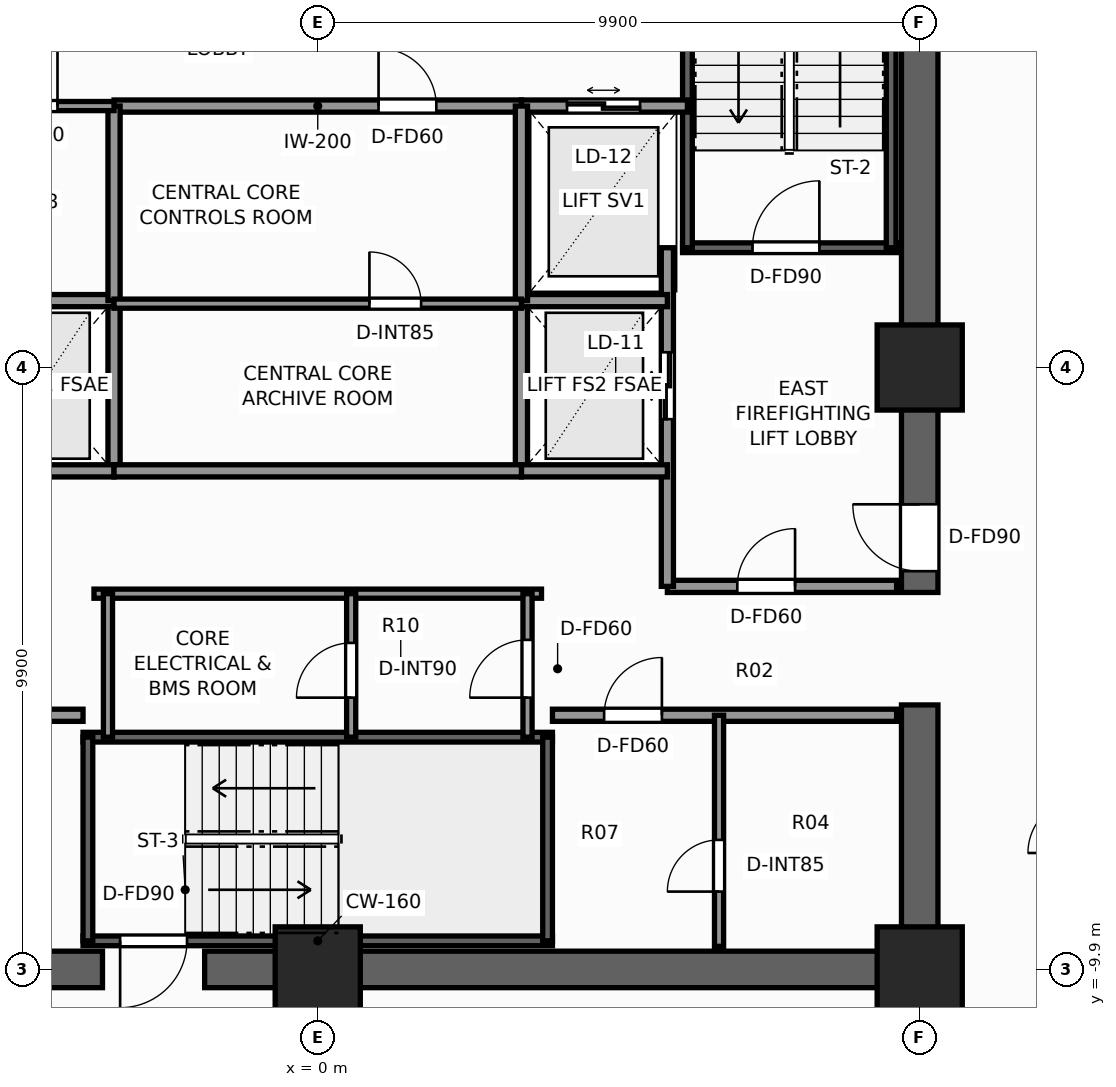
"""IFC4 building model, lengths in metres.
Left out: names, types, materials, properties, quantities, classifications, styles, units other than length and angle.
Written with IfcOpenShell. Run it as: python <this file> out.ifc"""

import sys

from ifc_helpers import new_model, si_unit, direction, frame, frame_2d, origin, origin_2d, place, context, subcontext, project, spatial, rectangle, extrude, element, fill, save


model = new_model("IFC4")
c1 = context("Model", 3, precision=1e-05, world=origin(), true_north=direction((0.0, 1.0)))
c2 = subcontext(c1, "Body", "Model", "MODEL_VIEW")
j1 = project(units=[si_unit("LENGTHUNIT", "METRE"), si_unit("PLANEANGLEUNIT", "RADIAN")], contexts=[c1])
p1 = place(None, origin())
s1 = spatial("IfcSite", under=j1, at=p1, CompositionType="ELEMENT")
p2 = place(p1, origin())
s2 = spatial("IfcBuilding", under=s1, at=p2, CompositionType="ELEMENT")
p3 = place(p2, frame((0.0, 0.0, 60.1)))
s3 = spatial("IfcBuildingStorey", under=s2, at=p3, CompositionType="ELEMENT", Elevation=60.1)
p4 = place(p3, frame((10.2, -9.9, 0.0), z_axis=(0.0, 0.0, 1.0), x_axis=(-1.0, 0.0, 0.0)))
e1 = element("IfcWall", 1, at=p4, inside=s3, PredefinedType="SHEAR", context=c2, shape_type="SweptSolid", body=[
    extrude(rectangle(XDim=12.06, YDim=0.6, at=frame_2d((6.03, 0.0))), origin(), (0.0, 0.0, 1.0), 3.3),
])
p5 = place(p3, frame((-3.54, -9.9, 0.0), z_axis=(0.0, 0.0, 1.0), x_axis=(-1.0, 0.0, 0.0)))
e2 = element("IfcWall", 2, at=p5, inside=s3, PredefinedType="SHEAR", context=c2, shape_type="SweptSolid", body=[
    extrude(rectangle(XDim=6.66, YDim=0.6, at=frame_2d((3.33, 0.0))), origin(), (0.0, 0.0, 1.0), 3.3),
])
p6 = place(p3, frame((9.9, -9.6, 0.0), z_axis=(0.0, 0.0, 1.0), x_axis=(0.0, 1.0, 0.0)))
e3 = element("IfcWall", 3, at=p6, inside=s3, PredefinedType="SHEAR", context=c2, shape_type="SweptSolid", body=[
    extrude(rectangle(XDim=4.05, YDim=0.6, at=frame_2d((2.025, 0.0))), origin(), (0.0, 0.0, 1.0), 3.3),
])
p7 = place(p3, frame((9.9, -3.7, 0.0), z_axis=(0.0, 0.0, 1.0), x_axis=(0.0, 1.0, 0.0)))
e4 = element("IfcWall", 4, at=p7, inside=s3, PredefinedType="SHEAR", context=c2, shape_type="SweptSolid", body=[
    extrude(rectangle(XDim=13.3, YDim=0.6, at=frame_2d((6.65, 0.0))), origin(), (0.0, 0.0, 1.0), 3.3),
])
p8 = place(p7, frame((0.35, 0.0, 0.0)))
e5 = element("IfcOpeningElement", 5, at=p8, cuts=e4, PredefinedType="OPENING", context=c2, shape_type="SweptSolid", body=[
    extrude(rectangle(XDim=1.1, YDim=2.2, at=frame_2d((0.55, 1.1))), frame((0.0, 0.31, 0.0), z_axis=(0.0, -1.0, 0.0), x_axis=(1.0, 0.0, 0.0)), (0.0, 0.0, 1.0), 0.62),
])
for number, where, z_axis, x_axis in (
    (6, (9.9, -9.9, 0.0), (0.0, 0.0, 1.0), (1.0, 0.0, 0.0)),
    (7, (0.0, -9.9, 0.0), (0.0, 0.0, 1.0), (1.0, 0.0, 0.0)),
    (8, (9.9, 0.0, 0.0), (0.0, 0.0, 1.0), (1.0, 0.0, 0.0)),
):
    element("IfcColumn", number, at=place(p3, frame(where, z_axis=z_axis, x_axis=x_axis)), inside=s3, PredefinedType="COLUMN", context=c2, shape_type="SweptSolid", body=[
        extrude(rectangle(XDim=1.4, YDim=1.4, at=origin_2d()), origin(), (0.0, 0.0, 1.0), 3.3),
    ])
p9 = place(p3, frame((6.0, 1.97, 0.0), z_axis=(0.0, 0.0, 1.0), x_axis=(1.0, 0.0, 0.0)))
e9 = element("IfcWall", 9, at=p9, inside=s3, PredefinedType="SHEAR", context=c2, shape_type="SweptSolid", body=[
    extrude(rectangle(XDim=3.52, YDim=0.16, at=frame_2d((1.76, 0.0))), origin(), (0.0, 0.0, 1.0), 3.3),
])
p10 = place(p9, frame((1.15, 0.0, 0.0)))
e10 = element("IfcOpeningElement", 10, at=p10, cuts=e9, PredefinedType="OPENING", context=c2, shape_type="SweptSolid", body=[
    extrude(rectangle(XDim=1.1, YDim=2.2, at=frame_2d((0.55, 1.1))), frame((0.0, 0.09, 0.0), z_axis=(0.0, -1.0, 0.0), x_axis=(1.0, 0.0, 0.0)), (0.0, 0.0, 1.0), 0.18),
])
for number, where, z_axis, x_axis in (
    (11, (6.08, 1.97, 0.0), (0.0, 0.0, 1.0), (0.0, 1.0, 0.0)),
    (12, (9.43, 1.97, 0.0), (0.0, 0.0, 1.0), (0.0, 1.0, 0.0)),
):
    element("IfcWall", number, at=place(p3, frame(where, z_axis=z_axis, x_axis=x_axis)), inside=s3, PredefinedType="SHEAR", context=c2, shape_type="SweptSolid", body=[
        extrude(rectangle(XDim=7.56, YDim=0.16, at=frame_2d((3.78, 0.0))), origin(), (0.0, 0.0, 1.0), 3.3),
    ])
p11 = place(p3, frame((3.86, -9.43, 0.0), z_axis=(0.0, 0.0, 1.0), x_axis=(-1.0, 0.0, 0.0)))
e13 = element("IfcWall", 13, at=p11, inside=s3, PredefinedType="SHEAR", context=c2, shape_type="SweptSolid", body=[
    extrude(rectangle(XDim=7.72, YDim=0.16, at=frame_2d((3.86, 0.0))), origin(), (0.0, 0.0, 1.0), 3.3),
])
p12 = place(p11, frame((6.01, 0.0, 0.0)))
e14 = element("IfcOpeningElement", 14, at=p12, cuts=e13, PredefinedType="OPENING", context=c2, shape_type="SweptSolid", body=[
    extrude(rectangle(XDim=1.1, YDim=2.2, at=frame_2d((0.55, 1.1))), frame((0.0, 0.09, 0.0), z_axis=(0.0, -1.0, 0.0), x_axis=(1.0, 0.0, 0.0)), (0.0, 0.0, 1.0), 0.18),
])
p13 = place(p3, frame((-3.86, -6.08, 0.0), z_axis=(0.0, 0.0, 1.0), x_axis=(1.0, 0.0, 0.0)))
e15 = element("IfcWall", 15, at=p13, inside=s3, PredefinedType="SHEAR", context=c2, shape_type="SweptSolid", body=[
    extrude(rectangle(XDim=7.72, YDim=0.16, at=frame_2d((3.86, 0.0))), origin(), (0.0, 0.0, 1.0), 3.3),
])
for number, where, z_axis, x_axis in (
    (16, (-3.78, -9.43, 0.0), (0.0, 0.0, 1.0), (0.0, 1.0, 0.0)),
    (17, (3.78, -9.43, 0.0), (0.0, 0.0, 1.0), (0.0, 1.0, 0.0)),
):
    element("IfcWall", number, at=place(p3, frame(where, z_axis=z_axis, x_axis=x_axis)), inside=s3, PredefinedType="SHEAR", context=c2, shape_type="SweptSolid", body=[
        extrude(rectangle(XDim=3.35, YDim=0.16, at=frame_2d((1.675, 0.0))), origin(), (0.0, 0.0, 1.0), 3.3),
    ])
p14 = place(p3, frame((-3.35, -1.7, 0.0), z_axis=(0.0, 0.0, 1.0), x_axis=(0.0, 1.0, 0.0)))
e18 = element("IfcWall", 18, at=p14, inside=s3, PredefinedType="SOLIDWALL", context=c2, shape_type="SweptSolid", body=[
    extrude(rectangle(XDim=2.8, YDim=0.2, at=frame_2d((1.4, 0.0))), origin(), (0.0, 0.0, 1.0), 2.95),
])
for number, where, z_axis, x_axis in (
    (19, (-5.75, -1.7, 0.0), (0.0, 0.0, 1.0), (1.0, 0.0, 0.0)),
    (20, (-5.75, 1.1, 0.0), (0.0, 0.0, 1.0), (1.0, 0.0, 0.0)),
):
    element("IfcWall", number, at=place(p3, frame(where, z_axis=z_axis, x_axis=x_axis)), inside=s3, PredefinedType="SOLIDWALL", context=c2, shape_type="SweptSolid", body=[
        extrude(rectangle(XDim=2.4, YDim=0.2, at=frame_2d((1.2, 0.0))), origin(), (0.0, 0.0, 1.0), 2.95),
    ])
p15 = place(p3, frame((5.75, -3.6, 0.0), z_axis=(0.0, 0.0, 1.0), x_axis=(1.0, 0.0, 0.0)))
e21 = element("IfcWall", 21, at=p15, inside=s3, PredefinedType="SOLIDWALL", context=c2, shape_type="SweptSolid", body=[
    extrude(rectangle(XDim=3.77, YDim=0.2, at=frame_2d((1.885, 0.0))), origin(), (0.0, 0.0, 1.0), 2.95),
])
p16 = place(p15, frame((1.15, 0.0, 0.0)))
e22 = element("IfcOpeningElement", 22, at=p16, cuts=e21, PredefinedType="OPENING", context=c2, shape_type="SweptSolid", body=[
    extrude(rectangle(XDim=0.95, YDim=2.06, at=frame_2d((0.475, 1.03))), frame((0.0, 0.11, 0.0), z_axis=(0.0, -1.0, 0.0), x_axis=(1.0, 0.0, 0.0)), (0.0, 0.0, 1.0), 0.22),
])
p17 = place(p3, frame((5.75, -3.6, 0.0), z_axis=(0.0, 0.0, 1.0), x_axis=(0.0, 1.0, 0.0)))
e23 = element("IfcWall", 23, at=p17, inside=s3, PredefinedType="SOLIDWALL", context=c2, shape_type="SweptSolid", body=[
    extrude(rectangle(XDim=5.57, YDim=0.2, at=frame_2d((2.785, 0.0))), origin(), (0.0, 0.0, 1.0), 2.95),
])
p18 = place(p17, frame((2.75, 0.0, 0.0)))
e24 = element("IfcOpeningElement", 24, at=p18, cuts=e23, PredefinedType="OPENING", context=c2, shape_type="SweptSolid", body=[
    extrude(rectangle(XDim=1.1, YDim=2.2, at=frame_2d((0.55, 1.1))), frame((0.0, 0.11, 0.0), z_axis=(0.0, -1.0, 0.0), x_axis=(1.0, 0.0, 0.0)), (0.0, 0.0, 1.0), 0.22),
])
p19 = place(p3, frame((3.35, -1.7, 0.0), z_axis=(0.0, 0.0, 1.0), x_axis=(0.0, 1.0, 0.0)))
e25 = element("IfcWall", 25, at=p19, inside=s3, PredefinedType="SOLIDWALL", context=c2, shape_type="SweptSolid", body=[
    extrude(rectangle(XDim=2.8, YDim=0.2, at=frame_2d((1.4, 0.0))), origin(), (0.0, 0.0, 1.0), 2.95),
])
for number, where, z_axis, x_axis in (
    (26, (3.35, -1.7, 0.0), (0.0, 0.0, 1.0), (1.0, 0.0, 0.0)),
    (27, (3.35, 1.1, 0.0), (0.0, 0.0, 1.0), (1.0, 0.0, 0.0)),
):
    element("IfcWall", number, at=place(p3, frame(where, z_axis=z_axis, x_axis=x_axis)), inside=s3, PredefinedType="SOLIDWALL", context=c2, shape_type="SweptSolid", body=[
        extrude(rectangle(XDim=2.4, YDim=0.2, at=frame_2d((1.2, 0.0))), origin(), (0.0, 0.0, 1.0), 2.95),
    ])
p20 = place(p3, frame((3.35, 4.3, 0.0), z_axis=(0.0, 0.0, 1.0), x_axis=(1.0, 0.0, 0.0)))
e28 = element("IfcWall", 28, at=p20, inside=s3, PredefinedType="SOLIDWALL", context=c2, shape_type="SweptSolid", body=[
    extrude(rectangle(XDim=2.73, YDim=0.2, at=frame_2d((1.365, 0.0))), origin(), (0.0, 0.0, 1.0), 2.95),
])
p21 = place(p20, frame((0.75, 0.0, 0.0)))
e29 = element("IfcOpeningElement", 29, at=p21, cuts=e28, PredefinedType="OPENING", context=c2, shape_type="SweptSolid", body=[
    extrude(rectangle(XDim=1.2, YDim=2.25, at=frame_2d((0.6, 1.125))), frame((0.0, 0.11, 0.0), z_axis=(0.0, -1.0, 0.0), x_axis=(1.0, 0.0, 0.0)), (0.0, 0.0, 1.0), 0.22),
])
p22 = place(p3, frame((-9.52, -5.72, 0.0), z_axis=(0.0, 0.0, 1.0), x_axis=(1.0, 0.0, 0.0)))
e30 = element("IfcWall", 30, at=p22, inside=s3, PredefinedType="SOLIDWALL", context=c2, shape_type="SweptSolid", body=[
    extrude(rectangle(XDim=5.66, YDim=0.2, at=frame_2d((2.83, 0.0))), origin(), (0.0, 0.0, 1.0), 2.95),
])
p23 = place(p22, frame((3.6, 0.0, 0.0)))
e31 = element("IfcOpeningElement", 31, at=p23, cuts=e30, PredefinedType="OPENING", context=c2, shape_type="SweptSolid", body=[
    extrude(rectangle(XDim=0.95, YDim=2.06, at=frame_2d((0.475, 1.03))), frame((0.0, 0.11, 0.0), z_axis=(0.0, -1.0, 0.0), x_axis=(1.0, 0.0, 0.0)), (0.0, 0.0, 1.0), 0.22),
])
p24 = place(p3, frame((3.86, -5.72, 0.0), z_axis=(0.0, 0.0, 1.0), x_axis=(1.0, 0.0, 0.0)))
e32 = element("IfcWall", 32, at=p24, inside=s3, PredefinedType="SOLIDWALL", context=c2, shape_type="SweptSolid", body=[
    extrude(rectangle(XDim=5.66, YDim=0.2, at=frame_2d((2.83, 0.0))), origin(), (0.0, 0.0, 1.0), 2.95),
])
p25 = place(p24, frame((0.85, 0.0, 0.0)))
e33 = element("IfcOpeningElement", 33, at=p25, cuts=e32, PredefinedType="OPENING", context=c2, shape_type="SweptSolid", body=[
    extrude(rectangle(XDim=0.95, YDim=2.06, at=frame_2d((0.475, 1.03))), frame((0.0, 0.11, 0.0), z_axis=(0.0, -1.0, 0.0), x_axis=(1.0, 0.0, 0.0)), (0.0, 0.0, 1.0), 0.22),
])
p26 = place(p3, frame((6.6, -9.52, 0.0), z_axis=(0.0, 0.0, 1.0), x_axis=(0.0, 1.0, 0.0)))
e34 = element("IfcWall", 34, at=p26, inside=s3, PredefinedType="PARTITIONING", context=c2, shape_type="SweptSolid", body=[
    extrude(rectangle(XDim=3.8, YDim=0.15, at=frame_2d((1.9, 0.0))), origin(), (0.0, 0.0, 1.0), 2.95),
])
p27 = place(p26, frame((0.9, 0.0, 0.0)))
e35 = element("IfcOpeningElement", 35, at=p27, cuts=e34, PredefinedType="OPENING", context=c2, shape_type="SweptSolid", body=[
    extrude(rectangle(XDim=0.85, YDim=2.03, at=frame_2d((0.425, 1.015))), frame((0.0, 0.085, 0.0), z_axis=(0.0, -1.0, 0.0), x_axis=(1.0, 0.0, 0.0)), (0.0, 0.0, 1.0), 0.17),
])
p28 = place(p3, frame((-3.35, 4.3, 0.0), z_axis=(0.0, 0.0, 1.0), x_axis=(1.0, 0.0, 0.0)))
e36 = element("IfcWall", 36, at=p28, inside=s3, PredefinedType="SOLIDWALL", context=c2, shape_type="SweptSolid", body=[
    extrude(rectangle(XDim=6.7, YDim=0.2, at=frame_2d((3.35, 0.0))), origin(), (0.0, 0.0, 1.0), 2.95),
])
p29 = place(p28, frame((4.35, 0.0, 0.0)))
e37 = element("IfcOpeningElement", 37, at=p29, cuts=e36, PredefinedType="OPENING", context=c2, shape_type="SweptSolid", body=[
    extrude(rectangle(XDim=0.95, YDim=2.06, at=frame_2d((0.475, 1.03))), frame((0.0, 0.11, 0.0), z_axis=(0.0, -1.0, 0.0), x_axis=(1.0, 0.0, 0.0)), (0.0, 0.0, 1.0), 0.22),
])
p30 = place(p3, frame((-3.35, -1.7, 0.0), z_axis=(0.0, 0.0, 1.0), x_axis=(1.0, 0.0, 0.0)))
e38 = element("IfcWall", 38, at=p30, inside=s3, PredefinedType="SOLIDWALL", context=c2, shape_type="SweptSolid", body=[
    extrude(rectangle(XDim=6.7, YDim=0.2, at=frame_2d((3.35, 0.0))), origin(), (0.0, 0.0, 1.0), 2.95),
])
for number, where, z_axis, x_axis in (
    (39, (-3.35, 1.1, 0.0), (0.0, 0.0, 1.0), (0.0, 1.0, 0.0)),
    (40, (3.35, 1.1, 0.0), (0.0, 0.0, 1.0), (0.0, 1.0, 0.0)),
):
    element("IfcWall", number, at=place(p3, frame(where, z_axis=z_axis, x_axis=x_axis)), inside=s3, PredefinedType="SOLIDWALL", context=c2, shape_type="SweptSolid", body=[
        extrude(rectangle(XDim=3.2, YDim=0.2, at=frame_2d((1.6, 0.0))), origin(), (0.0, 0.0, 1.0), 2.95),
    ])
p31 = place(p3, frame((-3.35, 1.05, 0.0), z_axis=(0.0, 0.0, 1.0), x_axis=(1.0, 0.0, 0.0)))
e41 = element("IfcWall", 41, at=p31, inside=s3, PredefinedType="PARTITIONING", context=c2, shape_type="SweptSolid", body=[
    extrude(rectangle(XDim=6.7, YDim=0.15, at=frame_2d((3.35, 0.0))), origin(), (0.0, 0.0, 1.0), 2.95),
])
p32 = place(p31, frame((4.2, 0.0, 0.0)))
e42 = element("IfcOpeningElement", 42, at=p32, cuts=e41, PredefinedType="OPENING", context=c2, shape_type="SweptSolid", body=[
    extrude(rectangle(XDim=0.85, YDim=2.03, at=frame_2d((0.425, 1.015))), frame((0.0, 0.085, 0.0), z_axis=(0.0, -1.0, 0.0), x_axis=(1.0, 0.0, 0.0)), (0.0, 0.0, 1.0), 0.17),
])
p33 = place(p3, frame((-3.68, -3.72, 0.0), z_axis=(0.0, 0.0, 1.0), x_axis=(1.0, 0.0, 0.0)))
e43 = element("IfcWall", 43, at=p33, inside=s3, PredefinedType="PARTITIONING", context=c2, shape_type="SweptSolid", body=[
    extrude(rectangle(XDim=7.36, YDim=0.15, at=frame_2d((3.68, 0.0))), origin(), (0.0, 0.0, 1.0), 2.95),
])
p34 = place(p3, frame((3.45, -6.08, 0.0), z_axis=(0.0, 0.0, 1.0), x_axis=(0.0, 1.0, 0.0)))
e44 = element("IfcWall", 44, at=p34, inside=s3, PredefinedType="PARTITIONING", context=c2, shape_type="SweptSolid", body=[
    extrude(rectangle(XDim=2.36, YDim=0.15, at=frame_2d((1.18, 0.0))), origin(), (0.0, 0.0, 1.0), 2.95),
])
p35 = place(p34, frame((0.65, 0.0, 0.0)))
e45 = element("IfcOpeningElement", 45, at=p35, cuts=e44, PredefinedType="OPENING", context=c2, shape_type="SweptSolid", body=[
    extrude(rectangle(XDim=0.95, YDim=2.06, at=frame_2d((0.475, 1.03))), frame((0.0, 0.085, 0.0), z_axis=(0.0, -1.0, 0.0), x_axis=(1.0, 0.0, 0.0)), (0.0, 0.0, 1.0), 0.17),
])
p36 = place(p3, frame((-3.45, -6.08, 0.0), z_axis=(0.0, 0.0, 1.0), x_axis=(0.0, 1.0, 0.0)))
e46 = element("IfcWall", 46, at=p36, inside=s3, PredefinedType="PARTITIONING", context=c2, shape_type="SweptSolid", body=[
    extrude(rectangle(XDim=2.36, YDim=0.15, at=frame_2d((1.18, 0.0))), origin(), (0.0, 0.0, 1.0), 2.95),
])
p37 = place(p3, frame((0.55, -6.08, 0.0), z_axis=(0.0, 0.0, 1.0), x_axis=(0.0, 1.0, 0.0)))
e47 = element("IfcWall", 47, at=p37, inside=s3, PredefinedType="PARTITIONING", context=c2, shape_type="SweptSolid", body=[
    extrude(rectangle(XDim=2.36, YDim=0.15, at=frame_2d((1.18, 0.0))), origin(), (0.0, 0.0, 1.0), 2.95),
])
p38 = place(p37, frame((0.65, 0.0, 0.0)))
e48 = element("IfcOpeningElement", 48, at=p38, cuts=e47, PredefinedType="OPENING", context=c2, shape_type="SweptSolid", body=[
    extrude(rectangle(XDim=0.9, YDim=2.06, at=frame_2d((0.45, 1.03))), frame((0.0, 0.085, 0.0), z_axis=(0.0, -1.0, 0.0), x_axis=(1.0, 0.0, 0.0)), (0.0, 0.0, 1.0), 0.17),
])
p39 = place(p3, frame((-6.08, 4.3, 0.0), z_axis=(0.0, 0.0, 1.0), x_axis=(1.0, 0.0, 0.0)))
e49 = element("IfcWall", 49, at=p39, inside=s3, PredefinedType="PARTITIONING", context=c2, shape_type="SweptSolid", body=[
    extrude(rectangle(XDim=2.73, YDim=0.15, at=frame_2d((1.365, 0.0))), origin(), (0.0, 0.0, 1.0), 2.95),
])
p40 = place(p39, frame((0.85, 0.0, 0.0)))
e50 = element("IfcOpeningElement", 50, at=p40, cuts=e49, PredefinedType="OPENING", context=c2, shape_type="SweptSolid", body=[
    extrude(rectangle(XDim=0.95, YDim=2.06, at=frame_2d((0.475, 1.03))), frame((0.0, 0.085, 0.0), z_axis=(0.0, -1.0, 0.0), x_axis=(1.0, 0.0, 0.0)), (0.0, 0.0, 1.0), 0.17),
])
p41 = place(p10, origin())
e51 = element("IfcDoor", 51, at=p41, inside=s3, OperationType="SINGLE_SWING_RIGHT", PredefinedType="DOOR", context=c2, shape_type="SweptSolid", body=[
    extrude(rectangle(XDim=1.1, YDim=2.2, at=frame_2d((0.55, 1.1))), frame((0.0, 0.025, 0.0), z_axis=(0.0, -1.0, 0.0), x_axis=(1.0, 0.0, 0.0)), (0.0, 0.0, 1.0), 0.05),
])
fill(e10, e51)
p42 = place(p12, origin())
e52 = element("IfcDoor", 52, at=p42, inside=s3, OperationType="SINGLE_SWING_RIGHT", PredefinedType="DOOR", context=c2, shape_type="SweptSolid", body=[
    extrude(rectangle(XDim=1.1, YDim=2.2, at=frame_2d((0.55, 1.1))), frame((0.0, 0.025, 0.0), z_axis=(0.0, -1.0, 0.0), x_axis=(1.0, 0.0, 0.0)), (0.0, 0.0, 1.0), 0.05),
])
fill(e14, e52)
p43 = place(p8, origin())
e53 = element("IfcDoor", 53, at=p43, inside=s3, OperationType="SINGLE_SWING_RIGHT", PredefinedType="DOOR", context=c2, shape_type="SweptSolid", body=[
    extrude(rectangle(XDim=1.1, YDim=2.2, at=frame_2d((0.55, 1.1))), frame((0.0, 0.025, 0.0), z_axis=(0.0, -1.0, 0.0), x_axis=(1.0, 0.0, 0.0)), (0.0, 0.0, 1.0), 0.05),
])
fill(e5, e53)
p44 = place(p18, origin())
e54 = element("IfcDoor", 54, at=p44, inside=s3, OperationType="DOUBLE_DOOR_SLIDING", PredefinedType="DOOR", context=c2, shape_type="SweptSolid", body=[
    extrude(rectangle(XDim=1.1, YDim=2.2, at=frame_2d((0.55, 1.1))), frame((0.0, 0.025, 0.0), z_axis=(0.0, -1.0, 0.0), x_axis=(1.0, 0.0, 0.0)), (0.0, 0.0, 1.0), 0.05),
])
fill(e24, e54)
p45 = place(p21, origin())
e55 = element("IfcDoor", 55, at=p45, inside=s3, OperationType="DOUBLE_DOOR_SLIDING", PredefinedType="DOOR", context=c2, shape_type="SweptSolid", body=[
    extrude(rectangle(XDim=1.2, YDim=2.25, at=frame_2d((0.6, 1.125))), frame((0.0, 0.025, 0.0), z_axis=(0.0, -1.0, 0.0), x_axis=(1.0, 0.0, 0.0)), (0.0, 0.0, 1.0), 0.05),
])
fill(e29, e55)
p46 = place(p25, origin())
e56 = element("IfcDoor", 56, at=p46, inside=s3, OperationType="SINGLE_SWING_RIGHT", PredefinedType="DOOR", context=c2, shape_type="SweptSolid", body=[
    extrude(rectangle(XDim=0.95, YDim=2.06, at=frame_2d((0.475, 1.03))), frame((0.0, 0.025, 0.0), z_axis=(0.0, -1.0, 0.0), x_axis=(1.0, 0.0, 0.0)), (0.0, 0.0, 1.0), 0.05),
])
fill(e33, e56)
p47 = place(p27, origin())
e57 = element("IfcDoor", 57, at=p47, inside=s3, OperationType="SINGLE_SWING_LEFT", PredefinedType="DOOR", context=c2, shape_type="SweptSolid", body=[
    extrude(rectangle(XDim=0.85, YDim=2.03, at=frame_2d((0.425, 1.015))), frame((0.0, 0.025, 0.0), z_axis=(0.0, -1.0, 0.0), x_axis=(1.0, 0.0, 0.0)), (0.0, 0.0, 1.0), 0.05),
])
fill(e35, e57)
p48 = place(p16, origin())
e58 = element("IfcDoor", 58, at=p48, inside=s3, OperationType="SINGLE_SWING_RIGHT", PredefinedType="DOOR", context=c2, shape_type="SweptSolid", body=[
    extrude(rectangle(XDim=0.95, YDim=2.06, at=frame_2d((0.475, 1.03))), frame((0.0, 0.025, 0.0), z_axis=(0.0, -1.0, 0.0), x_axis=(1.0, 0.0, 0.0)), (0.0, 0.0, 1.0), 0.05),
])
fill(e22, e58)
p49 = place(p29, origin())
e59 = element("IfcDoor", 59, at=p49, inside=s3, OperationType="SINGLE_SWING_LEFT", PredefinedType="DOOR", context=c2, shape_type="SweptSolid", body=[
    extrude(rectangle(XDim=0.95, YDim=2.06, at=frame_2d((0.475, 1.03))), frame((0.0, 0.025, 0.0), z_axis=(0.0, -1.0, 0.0), x_axis=(1.0, 0.0, 0.0)), (0.0, 0.0, 1.0), 0.05),
])
fill(e37, e59)
p50 = place(p32, origin())
e60 = element("IfcDoor", 60, at=p50, inside=s3, OperationType="SINGLE_SWING_LEFT", PredefinedType="DOOR", context=c2, shape_type="SweptSolid", body=[
    extrude(rectangle(XDim=0.85, YDim=2.03, at=frame_2d((0.425, 1.015))), frame((0.0, 0.025, 0.0), z_axis=(0.0, -1.0, 0.0), x_axis=(1.0, 0.0, 0.0)), (0.0, 0.0, 1.0), 0.05),
])
fill(e42, e60)
p51 = place(p35, origin())
e61 = element("IfcDoor", 61, at=p51, inside=s3, OperationType="SINGLE_SWING_LEFT", PredefinedType="DOOR", context=c2, shape_type="SweptSolid", body=[
    extrude(rectangle(XDim=0.95, YDim=2.06, at=frame_2d((0.475, 1.03))), frame((0.0, 0.025, 0.0), z_axis=(0.0, -1.0, 0.0), x_axis=(1.0, 0.0, 0.0)), (0.0, 0.0, 1.0), 0.05),
])
fill(e45, e61)
p52 = place(p38, origin())
e62 = element("IfcDoor", 62, at=p52, inside=s3, OperationType="SINGLE_SWING_LEFT", PredefinedType="DOOR", context=c2, shape_type="SweptSolid", body=[
    extrude(rectangle(XDim=0.9, YDim=2.06, at=frame_2d((0.45, 1.03))), frame((0.0, 0.025, 0.0), z_axis=(0.0, -1.0, 0.0), x_axis=(1.0, 0.0, 0.0)), (0.0, 0.0, 1.0), 0.05),
])
fill(e48, e62)
p53 = place(p40, origin())
e63 = element("IfcDoor", 63, at=p53, inside=s3, OperationType="SINGLE_SWING_RIGHT", PredefinedType="DOOR", context=c2, shape_type="SweptSolid", body=[
    extrude(rectangle(XDim=0.95, YDim=2.06, at=frame_2d((0.475, 1.03))), frame((0.0, 0.025, 0.0), z_axis=(0.0, -1.0, 0.0), x_axis=(1.0, 0.0, 0.0)), (0.0, 0.0, 1.0), 0.05),
])
fill(e50, e63)
save(model, sys.argv[1])
